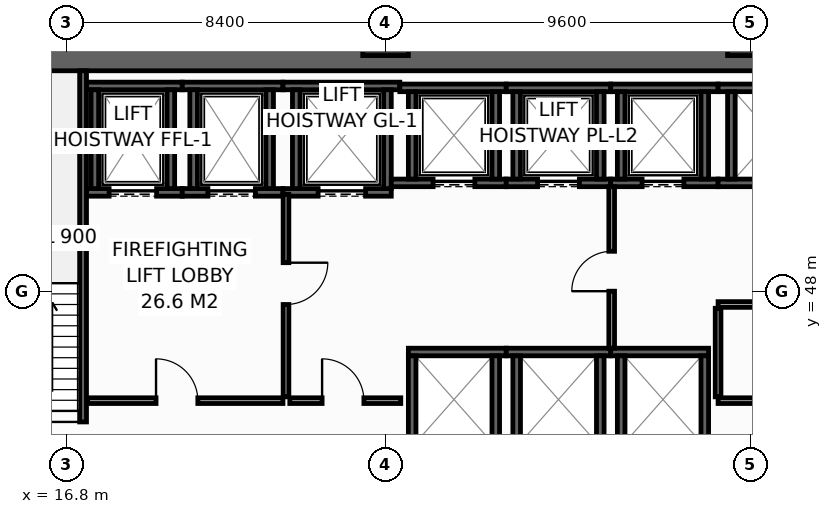
"""IFC4 building model, lengths in metres.
Left out: names, types, materials, properties, quantities, classifications, styles, units other than length and angle.
Written with IfcOpenShell. Run it as: python <this file> out.ifc"""

import sys

from ifc_helpers import new_model, si_unit, direction, frame, frame_2d, origin, origin_2d, place, context, subcontext, project, spatial, rectangle, hollow_rectangle, extrude, element, fill, save


model = new_model("IFC4")
c1 = context("Model", 3, precision=1e-05, world=origin(), true_north=direction((0.0, 1.0)))
c2 = subcontext(c1, "Body", "Model", "MODEL_VIEW")
j1 = project(units=[si_unit("LENGTHUNIT", "METRE"), si_unit("PLANEANGLEUNIT", "RADIAN")], contexts=[c1])
p1 = place(None, origin())
s1 = spatial("IfcSite", under=j1, at=p1, CompositionType="ELEMENT")
p2 = place(p1, origin())
s2 = spatial("IfcBuilding", under=s1, at=p2, CompositionType="ELEMENT")
p3 = place(p2, frame((0.0, 0.0, 38.4)))
s3 = spatial("IfcBuildingStorey", under=s2, at=p3, CompositionType="ELEMENT", Elevation=38.4)
p4 = place(p3, frame((13.5, 54.1, 0.0), z_axis=(0.0, 0.0, 1.0), x_axis=(1.0, 0.0, 0.0)))
e1 = element("IfcWall", 1, at=p4, inside=s3, PredefinedType="SHEAR", context=c2, shape_type="SweptSolid", body=[
    extrude(rectangle(XDim=32.9, YDim=0.6, at=frame_2d((16.45, 0.0))), origin(), (0.0, 0.0, 1.0), 4.15),
])
for number, where, z_axis, x_axis in (
    (2, (25.2, 54.8, 0.0), (0.0, 0.0, 1.0), (1.0, 0.0, 0.0)),
    (3, (34.8, 54.8, 0.0), (0.0, 0.0, 1.0), (1.0, 0.0, 0.0)),
):
    element("IfcColumn", number, at=place(p3, frame(where, z_axis=z_axis, x_axis=x_axis)), inside=s3, PredefinedType="COLUMN", context=c2, shape_type="SweptSolid", body=[
        extrude(hollow_rectangle(XDim=1.2, YDim=1.2, WallThickness=0.055, at=origin_2d()), origin(), (0.0, 0.0, 1.0), 4.4),
    ])
p5 = place(p3, frame((17.33, 50.6, 0.0), z_axis=(0.0, 0.0, 1.0), x_axis=(1.0, 0.0, 0.0)))
e4 = element("IfcWall", 4, at=p5, inside=s3, PredefinedType="SHEAR", context=c2, shape_type="SweptSolid", body=[
    extrude(rectangle(XDim=2.52, YDim=0.2, at=frame_2d((1.26, 0.0))), origin(), (0.0, 0.0, 1.0), 4.15),
])
p6 = place(p5, frame((0.595, 0.0, 0.0)))
e5 = element("IfcOpeningElement", 5, at=p6, cuts=e4, PredefinedType="OPENING", context=c2, shape_type="SweptSolid", body=[
    extrude(rectangle(XDim=1.25, YDim=2.3, at=frame_2d((0.625, 1.15))), frame((0.0, 0.11, 0.0), z_axis=(0.0, -1.0, 0.0), x_axis=(1.0, 0.0, 0.0)), (0.0, 0.0, 1.0), 0.22),
])
p7 = place(p3, frame((17.33, 53.4, 0.0), z_axis=(0.0, 0.0, 1.0), x_axis=(1.0, 0.0, 0.0)))
e6 = element("IfcWall", 6, at=p7, inside=s3, PredefinedType="SHEAR", context=c2, shape_type="SweptSolid", body=[
    extrude(rectangle(XDim=2.52, YDim=0.2, at=frame_2d((1.26, 0.0))), origin(), (0.0, 0.0, 1.0), 4.15),
])
for number, where, z_axis, x_axis in (
    (7, (17.55, 50.7, 0.0), (0.0, 0.0, 1.0), (0.0, 1.0, 0.0)),
    (8, (19.55, 50.7, 0.0), (0.0, 0.0, 1.0), (0.0, 1.0, 0.0)),
):
    element("IfcWall", number, at=place(p3, frame(where, z_axis=z_axis, x_axis=x_axis)), inside=s3, PredefinedType="SHEAR", context=c2, shape_type="SweptSolid", body=[
        extrude(rectangle(XDim=2.6, YDim=0.2, at=frame_2d((1.3, 0.0))), origin(), (0.0, 0.0, 1.0), 4.15),
    ])
p8 = place(p3, frame((19.85, 50.6, 0.0), z_axis=(0.0, 0.0, 1.0), x_axis=(1.0, 0.0, 0.0)))
e9 = element("IfcWall", 9, at=p8, inside=s3, PredefinedType="SHEAR", context=c2, shape_type="SweptSolid", body=[
    extrude(rectangle(XDim=2.65, YDim=0.2, at=frame_2d((1.325, 0.0))), origin(), (0.0, 0.0, 1.0), 4.15),
])
p9 = place(p8, frame((0.675, 0.0, 0.0)))
e10 = element("IfcOpeningElement", 10, at=p9, cuts=e9, PredefinedType="OPENING", context=c2, shape_type="SweptSolid", body=[
    extrude(rectangle(XDim=1.25, YDim=2.3, at=frame_2d((0.625, 1.15))), frame((0.0, 0.11, 0.0), z_axis=(0.0, -1.0, 0.0), x_axis=(1.0, 0.0, 0.0)), (0.0, 0.0, 1.0), 0.22),
])
p10 = place(p3, frame((19.85, 53.4, 0.0), z_axis=(0.0, 0.0, 1.0), x_axis=(1.0, 0.0, 0.0)))
e11 = element("IfcWall", 11, at=p10, inside=s3, PredefinedType="SHEAR", context=c2, shape_type="SweptSolid", body=[
    extrude(rectangle(XDim=2.65, YDim=0.2, at=frame_2d((1.325, 0.0))), origin(), (0.0, 0.0, 1.0), 4.15),
])
for number, where, z_axis, x_axis in (
    (12, (20.15, 50.7, 0.0), (0.0, 0.0, 1.0), (0.0, 1.0, 0.0)),
    (13, (22.15, 50.7, 0.0), (0.0, 0.0, 1.0), (0.0, 1.0, 0.0)),
):
    element("IfcWall", number, at=place(p3, frame(where, z_axis=z_axis, x_axis=x_axis)), inside=s3, PredefinedType="SHEAR", context=c2, shape_type="SweptSolid", body=[
        extrude(rectangle(XDim=2.6, YDim=0.2, at=frame_2d((1.3, 0.0))), origin(), (0.0, 0.0, 1.0), 4.15),
    ])
p11 = place(p3, frame((22.5, 50.6, 0.0), z_axis=(0.0, 0.0, 1.0), x_axis=(1.0, 0.0, 0.0)))
e14 = element("IfcWall", 14, at=p11, inside=s3, PredefinedType="SHEAR", context=c2, shape_type="SweptSolid", body=[
    extrude(rectangle(XDim=2.85, YDim=0.2, at=frame_2d((1.425, 0.0))), origin(), (0.0, 0.0, 1.0), 4.15),
])
p12 = place(p11, frame((0.925, 0.0, 0.0)))
e15 = element("IfcOpeningElement", 15, at=p12, cuts=e14, PredefinedType="OPENING", context=c2, shape_type="SweptSolid", body=[
    extrude(rectangle(XDim=1.25, YDim=2.3, at=frame_2d((0.625, 1.15))), frame((0.0, 0.11, 0.0), z_axis=(0.0, -1.0, 0.0), x_axis=(1.0, 0.0, 0.0)), (0.0, 0.0, 1.0), 0.22),
])
p13 = place(p3, frame((22.5, 53.4, 0.0), z_axis=(0.0, 0.0, 1.0), x_axis=(1.0, 0.0, 0.0)))
e16 = element("IfcWall", 16, at=p13, inside=s3, PredefinedType="SHEAR", context=c2, shape_type="SweptSolid", body=[
    extrude(rectangle(XDim=3.075, YDim=0.2, at=frame_2d((1.538, 0.0))), origin(), (0.0, 0.0, 1.0), 4.15),
])
for number, where, z_axis, x_axis in (
    (17, (22.85, 50.7, 0.0), (0.0, 0.0, 1.0), (0.0, 1.0, 0.0)),
    (18, (25.25, 50.7, 0.0), (0.0, 0.0, 1.0), (0.0, 1.0, 0.0)),
):
    element("IfcWall", number, at=place(p3, frame(where, z_axis=z_axis, x_axis=x_axis)), inside=s3, PredefinedType="SHEAR", context=c2, shape_type="SweptSolid", body=[
        extrude(rectangle(XDim=2.6, YDim=0.2, at=frame_2d((1.3, 0.0))), origin(), (0.0, 0.0, 1.0), 4.15),
    ])
p14 = place(p3, frame((25.35, 50.85, 0.0), z_axis=(0.0, 0.0, 1.0), x_axis=(1.0, 0.0, 0.0)))
e19 = element("IfcWall", 19, at=p14, inside=s3, PredefinedType="SHEAR", context=c2, shape_type="SweptSolid", body=[
    extrude(rectangle(XDim=3.025, YDim=0.2, at=frame_2d((1.512, 0.0))), origin(), (0.0, 0.0, 1.0), 4.15),
])
p15 = place(p14, frame((1.1, 0.0, 0.0)))
e20 = element("IfcOpeningElement", 20, at=p15, cuts=e19, PredefinedType="OPENING", context=c2, shape_type="SweptSolid", body=[
    extrude(rectangle(XDim=1.1, YDim=2.2, at=frame_2d((0.55, 1.1))), frame((0.0, 0.11, 0.0), z_axis=(0.0, -1.0, 0.0), x_axis=(1.0, 0.0, 0.0)), (0.0, 0.0, 1.0), 0.22),
])
p16 = place(p3, frame((25.575, 53.35, 0.0), z_axis=(0.0, 0.0, 1.0), x_axis=(1.0, 0.0, 0.0)))
e21 = element("IfcWall", 21, at=p16, inside=s3, PredefinedType="SHEAR", context=c2, shape_type="SweptSolid", body=[
    extrude(rectangle(XDim=2.8, YDim=0.2, at=frame_2d((1.4, 0.0))), origin(), (0.0, 0.0, 1.0), 4.15),
])
for number, where, z_axis, x_axis in (
    (22, (25.9, 50.95, 0.0), (0.0, 0.0, 1.0), (0.0, 1.0, 0.0)),
    (23, (28.1, 50.95, 0.0), (0.0, 0.0, 1.0), (0.0, 1.0, 0.0)),
):
    element("IfcWall", number, at=place(p3, frame(where, z_axis=z_axis, x_axis=x_axis)), inside=s3, PredefinedType="SHEAR", context=c2, shape_type="SweptSolid", body=[
        extrude(rectangle(XDim=2.3, YDim=0.2, at=frame_2d((1.15, 0.0))), origin(), (0.0, 0.0, 1.0), 4.15),
    ])
p17 = place(p3, frame((28.375, 50.85, 0.0), z_axis=(0.0, 0.0, 1.0), x_axis=(1.0, 0.0, 0.0)))
e24 = element("IfcWall", 24, at=p17, inside=s3, PredefinedType="SHEAR", context=c2, shape_type="SweptSolid", body=[
    extrude(rectangle(XDim=2.75, YDim=0.2, at=frame_2d((1.375, 0.0))), origin(), (0.0, 0.0, 1.0), 4.15),
])
p18 = place(p17, frame((0.825, 0.0, 0.0)))
e25 = element("IfcOpeningElement", 25, at=p18, cuts=e24, PredefinedType="OPENING", context=c2, shape_type="SweptSolid", body=[
    extrude(rectangle(XDim=1.1, YDim=2.2, at=frame_2d((0.55, 1.1))), frame((0.0, 0.11, 0.0), z_axis=(0.0, -1.0, 0.0), x_axis=(1.0, 0.0, 0.0)), (0.0, 0.0, 1.0), 0.22),
])
p19 = place(p3, frame((28.375, 53.35, 0.0), z_axis=(0.0, 0.0, 1.0), x_axis=(1.0, 0.0, 0.0)))
e26 = element("IfcWall", 26, at=p19, inside=s3, PredefinedType="SHEAR", context=c2, shape_type="SweptSolid", body=[
    extrude(rectangle(XDim=2.75, YDim=0.2, at=frame_2d((1.375, 0.0))), origin(), (0.0, 0.0, 1.0), 4.15),
])
for number, where, z_axis, x_axis in (
    (27, (28.65, 50.95, 0.0), (0.0, 0.0, 1.0), (0.0, 1.0, 0.0)),
    (28, (30.85, 50.95, 0.0), (0.0, 0.0, 1.0), (0.0, 1.0, 0.0)),
):
    element("IfcWall", number, at=place(p3, frame(where, z_axis=z_axis, x_axis=x_axis)), inside=s3, PredefinedType="SHEAR", context=c2, shape_type="SweptSolid", body=[
        extrude(rectangle(XDim=2.3, YDim=0.2, at=frame_2d((1.15, 0.0))), origin(), (0.0, 0.0, 1.0), 4.15),
    ])
p20 = place(p3, frame((31.125, 50.85, 0.0), z_axis=(0.0, 0.0, 1.0), x_axis=(1.0, 0.0, 0.0)))
e29 = element("IfcWall", 29, at=p20, inside=s3, PredefinedType="SHEAR", context=c2, shape_type="SweptSolid", body=[
    extrude(rectangle(XDim=2.825, YDim=0.2, at=frame_2d((1.413, 0.0))), origin(), (0.0, 0.0, 1.0), 4.15),
])
p21 = place(p20, frame((0.825, 0.0, 0.0)))
e30 = element("IfcOpeningElement", 30, at=p21, cuts=e29, PredefinedType="OPENING", context=c2, shape_type="SweptSolid", body=[
    extrude(rectangle(XDim=1.1, YDim=2.2, at=frame_2d((0.55, 1.1))), frame((0.0, 0.11, 0.0), z_axis=(0.0, -1.0, 0.0), x_axis=(1.0, 0.0, 0.0)), (0.0, 0.0, 1.0), 0.22),
])
p22 = place(p3, frame((31.125, 53.35, 0.0), z_axis=(0.0, 0.0, 1.0), x_axis=(1.0, 0.0, 0.0)))
e31 = element("IfcWall", 31, at=p22, inside=s3, PredefinedType="SHEAR", context=c2, shape_type="SweptSolid", body=[
    extrude(rectangle(XDim=2.825, YDim=0.2, at=frame_2d((1.413, 0.0))), origin(), (0.0, 0.0, 1.0), 4.15),
])
for number, where, z_axis, x_axis in (
    (32, (31.4, 50.95, 0.0), (0.0, 0.0, 1.0), (0.0, 1.0, 0.0)),
    (33, (33.6, 50.95, 0.0), (0.0, 0.0, 1.0), (0.0, 1.0, 0.0)),
):
    element("IfcWall", number, at=place(p3, frame(where, z_axis=z_axis, x_axis=x_axis)), inside=s3, PredefinedType="SHEAR", context=c2, shape_type="SweptSolid", body=[
        extrude(rectangle(XDim=2.3, YDim=0.2, at=frame_2d((1.15, 0.0))), origin(), (0.0, 0.0, 1.0), 4.15),
    ])
p23 = place(p3, frame((25.8, 46.4, 0.0), z_axis=(0.0, 0.0, 1.0), x_axis=(1.0, 0.0, 0.0)))
e34 = element("IfcWall", 34, at=p23, inside=s3, PredefinedType="SHEAR", context=c2, shape_type="SweptSolid", body=[
    extrude(rectangle(XDim=2.575, YDim=0.2, at=frame_2d((1.288, 0.0))), origin(), (0.0, 0.0, 1.0), 4.15),
])
for number, where, z_axis, x_axis in (
    (35, (25.9, 44.0, 0.0), (0.0, 0.0, 1.0), (0.0, 1.0, 0.0)),
    (36, (28.1, 44.0, 0.0), (0.0, 0.0, 1.0), (0.0, 1.0, 0.0)),
):
    element("IfcWall", number, at=place(p3, frame(where, z_axis=z_axis, x_axis=x_axis)), inside=s3, PredefinedType="SHEAR", context=c2, shape_type="SweptSolid", body=[
        extrude(rectangle(XDim=2.3, YDim=0.2, at=frame_2d((1.15, 0.0))), origin(), (0.0, 0.0, 1.0), 4.15),
    ])
p24 = place(p3, frame((28.375, 46.4, 0.0), z_axis=(0.0, 0.0, 1.0), x_axis=(1.0, 0.0, 0.0)))
e37 = element("IfcWall", 37, at=p24, inside=s3, PredefinedType="SHEAR", context=c2, shape_type="SweptSolid", body=[
    extrude(rectangle(XDim=2.75, YDim=0.2, at=frame_2d((1.375, 0.0))), origin(), (0.0, 0.0, 1.0), 4.15),
])
for number, where, z_axis, x_axis in (
    (38, (28.65, 44.0, 0.0), (0.0, 0.0, 1.0), (0.0, 1.0, 0.0)),
    (39, (30.85, 44.0, 0.0), (0.0, 0.0, 1.0), (0.0, 1.0, 0.0)),
):
    element("IfcWall", number, at=place(p3, frame(where, z_axis=z_axis, x_axis=x_axis)), inside=s3, PredefinedType="SHEAR", context=c2, shape_type="SweptSolid", body=[
        extrude(rectangle(XDim=2.3, YDim=0.2, at=frame_2d((1.15, 0.0))), origin(), (0.0, 0.0, 1.0), 4.15),
    ])
p25 = place(p3, frame((31.125, 46.4, 0.0), z_axis=(0.0, 0.0, 1.0), x_axis=(1.0, 0.0, 0.0)))
e40 = element("IfcWall", 40, at=p25, inside=s3, PredefinedType="SHEAR", context=c2, shape_type="SweptSolid", body=[
    extrude(rectangle(XDim=2.575, YDim=0.2, at=frame_2d((1.288, 0.0))), origin(), (0.0, 0.0, 1.0), 4.15),
])
for number, where, z_axis, x_axis in (
    (41, (31.4, 44.0, 0.0), (0.0, 0.0, 1.0), (0.0, 1.0, 0.0)),
    (42, (33.6, 44.0, 0.0), (0.0, 0.0, 1.0), (0.0, 1.0, 0.0)),
):
    element("IfcWall", number, at=place(p3, frame(where, z_axis=z_axis, x_axis=x_axis)), inside=s3, PredefinedType="SHEAR", context=c2, shape_type="SweptSolid", body=[
        extrude(rectangle(XDim=2.3, YDim=0.2, at=frame_2d((1.15, 0.0))), origin(), (0.0, 0.0, 1.0), 4.15),
    ])
for number, where, z_axis, x_axis in (
    (43, (33.95, 50.85, 0.0), (0.0, 0.0, 1.0), (1.0, 0.0, 0.0)),
    (44, (33.95, 53.35, 0.0), (0.0, 0.0, 1.0), (1.0, 0.0, 0.0)),
):
    element("IfcWall", number, at=place(p3, frame(where, z_axis=z_axis, x_axis=x_axis)), inside=s3, PredefinedType="SHEAR", context=c2, shape_type="SweptSolid", body=[
        extrude(rectangle(XDim=2.825, YDim=0.2, at=frame_2d((1.413, 0.0))), origin(), (0.0, 0.0, 1.0), 4.15),
    ])
p26 = place(p3, frame((34.3, 50.95, 0.0), z_axis=(0.0, 0.0, 1.0), x_axis=(0.0, 1.0, 0.0)))
e45 = element("IfcWall", 45, at=p26, inside=s3, PredefinedType="SHEAR", context=c2, shape_type="SweptSolid", body=[
    extrude(rectangle(XDim=2.3, YDim=0.2, at=frame_2d((1.15, 0.0))), origin(), (0.0, 0.0, 1.0), 4.15),
])
p27 = place(p3, frame((17.24, 43.4, 0.0), z_axis=(0.0, 0.0, 1.0), x_axis=(0.0, 1.0, 0.0)))
e46 = element("IfcWall", 46, at=p27, inside=s3, PredefinedType="SHEAR", context=c2, shape_type="SweptSolid", body=[
    extrude(rectangle(XDim=10.4, YDim=0.18, at=frame_2d((5.2, 0.0))), origin(), (0.0, 0.0, 1.0), 4.15),
])
p28 = place(p27, frame((0.16, 0.0, 0.0)))
e47 = element("IfcOpeningElement", 47, at=p28, cuts=e46, PredefinedType="OPENING", context=c2, shape_type="SweptSolid", body=[
    extrude(rectangle(XDim=1.0, YDim=2.15, at=frame_2d((0.5, 1.075))), frame((0.0, 0.1, 0.0), z_axis=(0.0, -1.0, 0.0), x_axis=(1.0, 0.0, 0.0)), (0.0, 0.0, 1.0), 0.2),
])
p29 = place(p3, frame((17.36, 45.12, 0.0), z_axis=(0.0, 0.0, 1.0), x_axis=(1.0, 0.0, 0.0)))
e48 = element("IfcWall", 48, at=p29, inside=s3, PredefinedType="PARTITIONING", context=c2, shape_type="SweptSolid", body=[
    extrude(rectangle(XDim=5.14, YDim=0.15, at=frame_2d((2.57, 0.0))), origin(), (0.0, 0.0, 1.0), 4.15),
])
p30 = place(p29, frame((1.8, 0.0, 0.0)))
e49 = element("IfcOpeningElement", 49, at=p30, cuts=e48, PredefinedType="OPENING", context=c2, shape_type="SweptSolid", body=[
    extrude(rectangle(XDim=1.1, YDim=2.15, at=frame_2d((0.55, 1.075))), frame((0.0, 0.085, 0.0), z_axis=(0.0, -1.0, 0.0), x_axis=(1.0, 0.0, 0.0)), (0.0, 0.0, 1.0), 0.17),
])
p31 = place(p3, frame((22.58, 50.55, 0.0), z_axis=(0.0, 0.0, 1.0), x_axis=(0.0, -1.0, 0.0)))
e50 = element("IfcWall", 50, at=p31, inside=s3, PredefinedType="PARTITIONING", context=c2, shape_type="SweptSolid", body=[
    extrude(rectangle(XDim=5.33, YDim=0.15, at=frame_2d((2.665, 0.0))), origin(), (0.0, 0.0, 1.0), 4.15),
])
p32 = place(p31, frame((1.8, 0.0, 0.0)))
e51 = element("IfcOpeningElement", 51, at=p32, cuts=e50, PredefinedType="OPENING", context=c2, shape_type="SweptSolid", body=[
    extrude(rectangle(XDim=1.1, YDim=2.15, at=frame_2d((0.55, 1.075))), frame((0.0, 0.085, 0.0), z_axis=(0.0, -1.0, 0.0), x_axis=(1.0, 0.0, 0.0)), (0.0, 0.0, 1.0), 0.17),
])
p33 = place(p3, frame((22.68, 45.12, 0.0), z_axis=(0.0, 0.0, 1.0), x_axis=(1.0, 0.0, 0.0)))
e52 = element("IfcWall", 52, at=p33, inside=s3, PredefinedType="PARTITIONING", context=c2, shape_type="SweptSolid", body=[
    extrude(rectangle(XDim=2.92, YDim=0.15, at=frame_2d((1.46, 0.0))), origin(), (0.0, 0.0, 1.0), 4.15),
])
p34 = place(p33, frame((0.85, 0.0, 0.0)))
e53 = element("IfcOpeningElement", 53, at=p34, cuts=e52, PredefinedType="OPENING", context=c2, shape_type="SweptSolid", body=[
    extrude(rectangle(XDim=1.1, YDim=2.15, at=frame_2d((0.55, 1.075))), frame((0.0, 0.085, 0.0), z_axis=(0.0, -1.0, 0.0), x_axis=(1.0, 0.0, 0.0)), (0.0, 0.0, 1.0), 0.17),
])
p35 = place(p3, frame((31.15, 46.5, 0.0), z_axis=(0.0, 0.0, 1.0), x_axis=(0.0, 1.0, 0.0)))
e54 = element("IfcWall", 54, at=p35, inside=s3, PredefinedType="PARTITIONING", context=c2, shape_type="SweptSolid", body=[
    extrude(rectangle(XDim=4.25, YDim=0.15, at=frame_2d((2.125, 0.0))), origin(), (0.0, 0.0, 1.0), 4.15),
])
p36 = place(p35, frame((1.5, 0.0, 0.0)))
e55 = element("IfcOpeningElement", 55, at=p36, cuts=e54, PredefinedType="OPENING", context=c2, shape_type="SweptSolid", body=[
    extrude(rectangle(XDim=1.05, YDim=2.15, at=frame_2d((0.525, 1.075))), frame((0.0, 0.085, 0.0), z_axis=(0.0, -1.0, 0.0), x_axis=(1.0, 0.0, 0.0)), (0.0, 0.0, 1.0), 0.17),
])
p37 = place(p3, frame((33.95, 45.12, 0.0), z_axis=(0.0, 0.0, 1.0), x_axis=(1.0, 0.0, 0.0)))
e56 = element("IfcWall", 56, at=p37, inside=s3, PredefinedType="PARTITIONING", context=c2, shape_type="SweptSolid", body=[
    extrude(rectangle(XDim=8.55, YDim=0.15, at=frame_2d((4.275, 0.0))), origin(), (0.0, 0.0, 1.0), 4.15),
])
p38 = place(p37, frame((0.95, 0.0, 0.0)))
e57 = element("IfcOpeningElement", 57, at=p38, cuts=e56, PredefinedType="OPENING", context=c2, shape_type="SweptSolid", body=[
    extrude(rectangle(XDim=0.95, YDim=2.15, at=frame_2d((0.475, 1.075))), frame((0.0, 0.085, 0.0), z_axis=(0.0, -1.0, 0.0), x_axis=(1.0, 0.0, 0.0)), (0.0, 0.0, 1.0), 0.17),
])
p39 = place(p37, frame((3.8, 0.0, 0.0)))
e58 = element("IfcOpeningElement", 58, at=p39, cuts=e56, PredefinedType="OPENING", context=c2, shape_type="SweptSolid", body=[
    extrude(rectangle(XDim=0.95, YDim=2.15, at=frame_2d((0.475, 1.075))), frame((0.0, 0.085, 0.0), z_axis=(0.0, -1.0, 0.0), x_axis=(1.0, 0.0, 0.0)), (0.0, 0.0, 1.0), 0.17),
])
p40 = place(p37, frame((6.65, 0.0, 0.0)))
e59 = element("IfcOpeningElement", 59, at=p40, cuts=e56, PredefinedType="OPENING", context=c2, shape_type="SweptSolid", body=[
    extrude(rectangle(XDim=0.95, YDim=2.15, at=frame_2d((0.475, 1.075))), frame((0.0, 0.085, 0.0), z_axis=(0.0, -1.0, 0.0), x_axis=(1.0, 0.0, 0.0)), (0.0, 0.0, 1.0), 0.17),
])
p41 = place(p3, frame((33.95, 47.65, 0.0), z_axis=(0.0, 0.0, 1.0), x_axis=(1.0, 0.0, 0.0)))
e60 = element("IfcWall", 60, at=p41, inside=s3, PredefinedType="PARTITIONING", context=c2, shape_type="SweptSolid", body=[
    extrude(rectangle(XDim=8.55, YDim=0.15, at=frame_2d((4.275, 0.0))), origin(), (0.0, 0.0, 1.0), 4.15),
])
p42 = place(p3, frame((33.95, 45.22, 0.0), z_axis=(0.0, 0.0, 1.0), x_axis=(0.0, 1.0, 0.0)))
e61 = element("IfcWall", 61, at=p42, inside=s3, PredefinedType="PARTITIONING", context=c2, shape_type="SweptSolid", body=[
    extrude(rectangle(XDim=2.33, YDim=0.15, at=frame_2d((1.165, 0.0))), origin(), (0.0, 0.0, 1.0), 4.15),
])
p43 = place(p6, origin())
e62 = element("IfcDoor", 62, at=p43, inside=s3, OperationType="SLIDING_TO_LEFT", PredefinedType="DOOR", context=c2, shape_type="SweptSolid", body=[
    extrude(rectangle(XDim=1.25, YDim=2.3, at=frame_2d((0.625, 1.15))), frame((0.0, 0.025, 0.0), z_axis=(0.0, -1.0, 0.0), x_axis=(1.0, 0.0, 0.0)), (0.0, 0.0, 1.0), 0.05),
])
fill(e5, e62)
p44 = place(p9, origin())
e63 = element("IfcDoor", 63, at=p44, inside=s3, OperationType="SLIDING_TO_LEFT", PredefinedType="DOOR", context=c2, shape_type="SweptSolid", body=[
    extrude(rectangle(XDim=1.25, YDim=2.3, at=frame_2d((0.625, 1.15))), frame((0.0, 0.025, 0.0), z_axis=(0.0, -1.0, 0.0), x_axis=(1.0, 0.0, 0.0)), (0.0, 0.0, 1.0), 0.05),
])
fill(e10, e63)
p45 = place(p12, origin())
e64 = element("IfcDoor", 64, at=p45, inside=s3, OperationType="SLIDING_TO_LEFT", PredefinedType="DOOR", context=c2, shape_type="SweptSolid", body=[
    extrude(rectangle(XDim=1.25, YDim=2.3, at=frame_2d((0.625, 1.15))), frame((0.0, 0.025, 0.0), z_axis=(0.0, -1.0, 0.0), x_axis=(1.0, 0.0, 0.0)), (0.0, 0.0, 1.0), 0.05),
])
fill(e15, e64)
p46 = place(p15, origin())
e65 = element("IfcDoor", 65, at=p46, inside=s3, OperationType="SLIDING_TO_LEFT", PredefinedType="DOOR", context=c2, shape_type="SweptSolid", body=[
    extrude(rectangle(XDim=1.1, YDim=2.2, at=frame_2d((0.55, 1.1))), frame((0.0, 0.025, 0.0), z_axis=(0.0, -1.0, 0.0), x_axis=(1.0, 0.0, 0.0)), (0.0, 0.0, 1.0), 0.05),
])
fill(e20, e65)
p47 = place(p18, origin())
e66 = element("IfcDoor", 66, at=p47, inside=s3, OperationType="SLIDING_TO_LEFT", PredefinedType="DOOR", context=c2, shape_type="SweptSolid", body=[
    extrude(rectangle(XDim=1.1, YDim=2.2, at=frame_2d((0.55, 1.1))), frame((0.0, 0.025, 0.0), z_axis=(0.0, -1.0, 0.0), x_axis=(1.0, 0.0, 0.0)), (0.0, 0.0, 1.0), 0.05),
])
fill(e25, e66)
p48 = place(p21, origin())
e67 = element("IfcDoor", 67, at=p48, inside=s3, OperationType="SLIDING_TO_LEFT", PredefinedType="DOOR", context=c2, shape_type="SweptSolid", body=[
    extrude(rectangle(XDim=1.1, YDim=2.2, at=frame_2d((0.55, 1.1))), frame((0.0, 0.025, 0.0), z_axis=(0.0, -1.0, 0.0), x_axis=(1.0, 0.0, 0.0)), (0.0, 0.0, 1.0), 0.05),
])
fill(e30, e67)
p49 = place(p28, origin())
e68 = element("IfcDoor", 68, at=p49, inside=s3, OperationType="SINGLE_SWING_RIGHT", PredefinedType="DOOR", context=c2, shape_type="SweptSolid", body=[
    extrude(rectangle(XDim=1.0, YDim=2.15, at=frame_2d((0.5, 1.075))), frame((0.0, 0.025, 0.0), z_axis=(0.0, -1.0, 0.0), x_axis=(1.0, 0.0, 0.0)), (0.0, 0.0, 1.0), 0.05),
])
fill(e47, e68)
p50 = place(p30, origin())
e69 = element("IfcDoor", 69, at=p50, inside=s3, OperationType="SINGLE_SWING_LEFT", PredefinedType="DOOR", context=c2, shape_type="SweptSolid", body=[
    extrude(rectangle(XDim=1.1, YDim=2.15, at=frame_2d((0.55, 1.075))), frame((0.0, 0.025, 0.0), z_axis=(0.0, -1.0, 0.0), x_axis=(1.0, 0.0, 0.0)), (0.0, 0.0, 1.0), 0.05),
])
fill(e49, e69)
p51 = place(p32, origin())
e70 = element("IfcDoor", 70, at=p51, inside=s3, OperationType="SINGLE_SWING_LEFT", PredefinedType="DOOR", context=c2, shape_type="SweptSolid", body=[
    extrude(rectangle(XDim=1.1, YDim=2.15, at=frame_2d((0.55, 1.075))), frame((0.0, 0.025, 0.0), z_axis=(0.0, -1.0, 0.0), x_axis=(1.0, 0.0, 0.0)), (0.0, 0.0, 1.0), 0.05),
])
fill(e51, e70)
p52 = place(p34, origin())
e71 = element("IfcDoor", 71, at=p52, inside=s3, OperationType="SINGLE_SWING_LEFT", PredefinedType="DOOR", context=c2, shape_type="SweptSolid", body=[
    extrude(rectangle(XDim=1.1, YDim=2.15, at=frame_2d((0.55, 1.075))), frame((0.0, 0.025, 0.0), z_axis=(0.0, -1.0, 0.0), x_axis=(1.0, 0.0, 0.0)), (0.0, 0.0, 1.0), 0.05),
])
fill(e53, e71)
p53 = place(p36, origin())
e72 = element("IfcDoor", 72, at=p53, inside=s3, OperationType="SINGLE_SWING_LEFT", PredefinedType="DOOR", context=c2, shape_type="SweptSolid", body=[
    extrude(rectangle(XDim=1.05, YDim=2.15, at=frame_2d((0.525, 1.075))), frame((0.0, 0.025, 0.0), z_axis=(0.0, -1.0, 0.0), x_axis=(1.0, 0.0, 0.0)), (0.0, 0.0, 1.0), 0.05),
])
fill(e55, e72)
save(model, sys.argv[1])
